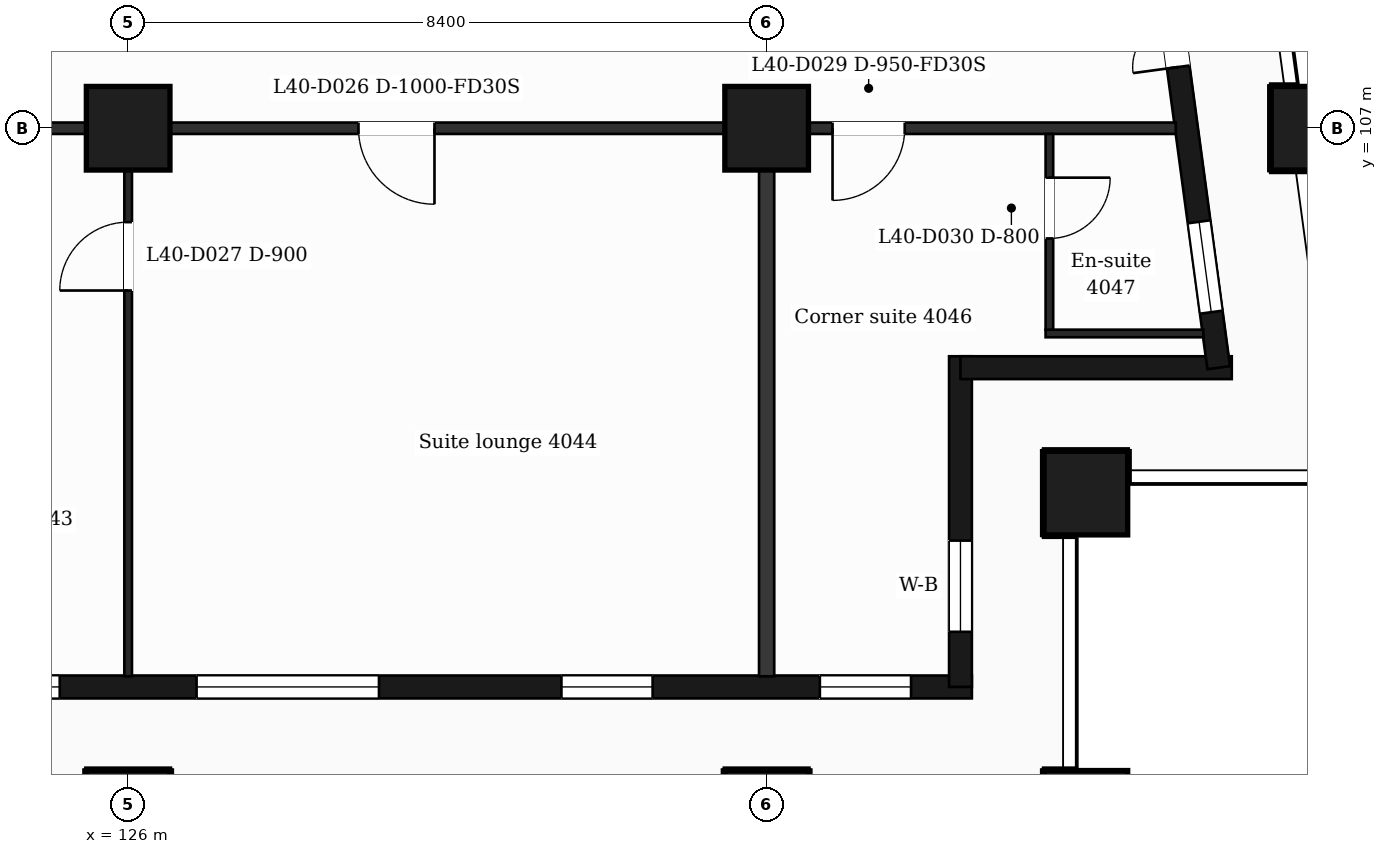
"""IFC4 building model, lengths in metres.
Left out: names, types, materials, properties, quantities, classifications, styles, units other than length and angle.
Written with IfcOpenShell. Run it as: python <this file> out.ifc"""

import sys

from ifc_helpers import new_model, si_unit, direction, frame, frame_2d, origin, origin_2d, place, context, subcontext, project, spatial, rectangle, extrude, element, fill, save


model = new_model("IFC4")
c1 = context("Model", 3, precision=1e-05, world=origin(), true_north=direction((0.0, 1.0)))
c2 = subcontext(c1, "Body", "Model", "MODEL_VIEW")
j1 = project(units=[si_unit("LENGTHUNIT", "METRE"), si_unit("PLANEANGLEUNIT", "RADIAN")], contexts=[c1])
p1 = place(None, origin())
s1 = spatial("IfcSite", under=j1, at=p1, CompositionType="ELEMENT")
p2 = place(p1, origin())
s2 = spatial("IfcBuilding", under=s1, at=p2, CompositionType="ELEMENT")
p3 = place(p2, frame((0.0, 0.0, 170.0)))
s3 = spatial("IfcBuildingStorey", under=s2, at=p3, CompositionType="ELEMENT", Elevation=170.0)
for number, where, z_axis, x_axis in (
    (1, (126.0, 98.0, 0.0), (0.0, 0.0, 1.0), (1.0, 0.0, 0.0)),
    (2, (134.4, 98.0, 0.0), (0.0, 0.0, 1.0), (1.0, 0.0, 0.0)),
    (3, (138.6, 98.0, 0.0), (0.0, 0.0, 1.0), (1.0, 0.0, 0.0)),
    (4, (138.6, 102.2, 0.0), (0.0, 0.0, 1.0), (1.0, 0.0, 0.0)),
    (5, (126.0, 107.0, 0.0), (0.0, 0.0, 1.0), (1.0, 0.0, 0.0)),
    (6, (134.4, 107.0, 0.0), (0.0, 0.0, 1.0), (1.0, 0.0, 0.0)),
    (7, (141.588, 107.0, 0.0), (0.0, 0.0, 1.0), (1.0, 0.0, 0.0)),
):
    element("IfcColumn", number, at=place(p3, frame(where, z_axis=z_axis, x_axis=x_axis)), inside=s3, PredefinedType="COLUMN", context=c2, shape_type="SweptSolid", body=[
        extrude(rectangle(XDim=1.1, YDim=1.1, at=origin_2d()), origin(), (0.0, 0.0, 1.0), 3.7),
    ])
p4 = place(p3, frame((89.85, 99.65, 0.0), z_axis=(0.0, 0.0, 1.0), x_axis=(1.0, 0.0, 0.0)))
e8 = element("IfcWall", 8, at=p4, inside=s3, PredefinedType="SOLIDWALL", context=c2, shape_type="SweptSolid", body=[
    extrude(rectangle(XDim=47.25, YDim=0.3, at=frame_2d((23.625, 0.0))), origin(), (0.0, 0.0, 1.0), 3.38),
])
p5 = place(p4, frame((0.725, 0.0, 0.9)))
e9 = element("IfcOpeningElement", 9, at=p5, cuts=e8, PredefinedType="OPENING", context=c2, shape_type="SweptSolid", body=[
    extrude(rectangle(XDim=1.2, YDim=2.1, at=frame_2d((0.6, 1.05))), frame((0.0, 0.16, 0.0), z_axis=(0.0, -1.0, 0.0), x_axis=(1.0, 0.0, 0.0)), (0.0, 0.0, 1.0), 0.32),
])
p6 = place(p4, frame((3.45, 0.0, 0.9)))
e10 = element("IfcOpeningElement", 10, at=p6, cuts=e8, PredefinedType="OPENING", context=c2, shape_type="SweptSolid", body=[
    extrude(rectangle(XDim=2.4, YDim=2.1, at=frame_2d((1.2, 1.05))), frame((0.0, 0.16, 0.0), z_axis=(0.0, -1.0, 0.0), x_axis=(1.0, 0.0, 0.0)), (0.0, 0.0, 1.0), 0.32),
])
p7 = place(p4, frame((7.65, 0.0, 0.9)))
e11 = element("IfcOpeningElement", 11, at=p7, cuts=e8, PredefinedType="OPENING", context=c2, shape_type="SweptSolid", body=[
    extrude(rectangle(XDim=2.4, YDim=2.1, at=frame_2d((1.2, 1.05))), frame((0.0, 0.16, 0.0), z_axis=(0.0, -1.0, 0.0), x_axis=(1.0, 0.0, 0.0)), (0.0, 0.0, 1.0), 0.32),
])
p8 = place(p4, frame((12.45, 0.0, 0.9)))
e12 = element("IfcOpeningElement", 12, at=p8, cuts=e8, PredefinedType="OPENING", context=c2, shape_type="SweptSolid", body=[
    extrude(rectangle(XDim=1.2, YDim=2.1, at=frame_2d((0.6, 1.05))), frame((0.0, 0.16, 0.0), z_axis=(0.0, -1.0, 0.0), x_axis=(1.0, 0.0, 0.0)), (0.0, 0.0, 1.0), 0.32),
])
p9 = place(p4, frame((16.65, 0.0, 0.9)))
e13 = element("IfcOpeningElement", 13, at=p9, cuts=e8, PredefinedType="OPENING", context=c2, shape_type="SweptSolid", body=[
    extrude(rectangle(XDim=1.2, YDim=2.1, at=frame_2d((0.6, 1.05))), frame((0.0, 0.16, 0.0), z_axis=(0.0, -1.0, 0.0), x_axis=(1.0, 0.0, 0.0)), (0.0, 0.0, 1.0), 0.32),
])
p10 = place(p4, frame((19.95, 0.0, 0.0)))
e14 = element("IfcOpeningElement", 14, at=p10, cuts=e8, PredefinedType="OPENING", context=c2, shape_type="SweptSolid", body=[
    extrude(rectangle(XDim=1.2, YDim=2.4, at=frame_2d((0.6, 1.2))), frame((0.0, 0.16, 0.0), z_axis=(0.0, -1.0, 0.0), x_axis=(1.0, 0.0, 0.0)), (0.0, 0.0, 1.0), 0.32),
])
p11 = place(p4, frame((21.75, 0.0, 0.9)))
e15 = element("IfcOpeningElement", 15, at=p11, cuts=e8, PredefinedType="OPENING", context=c2, shape_type="SweptSolid", body=[
    extrude(rectangle(XDim=1.2, YDim=2.1, at=frame_2d((0.6, 1.05))), frame((0.0, 0.16, 0.0), z_axis=(0.0, -1.0, 0.0), x_axis=(1.0, 0.0, 0.0)), (0.0, 0.0, 1.0), 0.32),
])
p12 = place(p4, frame((24.45, 0.0, 0.9)))
e16 = element("IfcOpeningElement", 16, at=p12, cuts=e8, PredefinedType="OPENING", context=c2, shape_type="SweptSolid", body=[
    extrude(rectangle(XDim=2.4, YDim=2.1, at=frame_2d((1.2, 1.05))), frame((0.0, 0.16, 0.0), z_axis=(0.0, -1.0, 0.0), x_axis=(1.0, 0.0, 0.0)), (0.0, 0.0, 1.0), 0.32),
])
p13 = place(p4, frame((28.35, 0.0, 0.0)))
e17 = element("IfcOpeningElement", 17, at=p13, cuts=e8, PredefinedType="OPENING", context=c2, shape_type="SweptSolid", body=[
    extrude(rectangle(XDim=1.2, YDim=2.4, at=frame_2d((0.6, 1.2))), frame((0.0, 0.16, 0.0), z_axis=(0.0, -1.0, 0.0), x_axis=(1.0, 0.0, 0.0)), (0.0, 0.0, 1.0), 0.32),
])
p14 = place(p4, frame((30.15, 0.0, 0.9)))
e18 = element("IfcOpeningElement", 18, at=p14, cuts=e8, PredefinedType="OPENING", context=c2, shape_type="SweptSolid", body=[
    extrude(rectangle(XDim=1.2, YDim=2.1, at=frame_2d((0.6, 1.05))), frame((0.0, 0.16, 0.0), z_axis=(0.0, -1.0, 0.0), x_axis=(1.0, 0.0, 0.0)), (0.0, 0.0, 1.0), 0.32),
])
p15 = place(p4, frame((32.85, 0.0, 0.9)))
e19 = element("IfcOpeningElement", 19, at=p15, cuts=e8, PredefinedType="OPENING", context=c2, shape_type="SweptSolid", body=[
    extrude(rectangle(XDim=2.4, YDim=2.1, at=frame_2d((1.2, 1.05))), frame((0.0, 0.16, 0.0), z_axis=(0.0, -1.0, 0.0), x_axis=(1.0, 0.0, 0.0)), (0.0, 0.0, 1.0), 0.32),
])
p16 = place(p4, frame((37.05, 0.0, 0.9)))
e20 = element("IfcOpeningElement", 20, at=p16, cuts=e8, PredefinedType="OPENING", context=c2, shape_type="SweptSolid", body=[
    extrude(rectangle(XDim=2.4, YDim=2.1, at=frame_2d((1.2, 1.05))), frame((0.0, 0.16, 0.0), z_axis=(0.0, -1.0, 0.0), x_axis=(1.0, 0.0, 0.0)), (0.0, 0.0, 1.0), 0.32),
])
p17 = place(p4, frame((41.85, 0.0, 0.9)))
e21 = element("IfcOpeningElement", 21, at=p17, cuts=e8, PredefinedType="OPENING", context=c2, shape_type="SweptSolid", body=[
    extrude(rectangle(XDim=1.2, YDim=2.1, at=frame_2d((0.6, 1.05))), frame((0.0, 0.16, 0.0), z_axis=(0.0, -1.0, 0.0), x_axis=(1.0, 0.0, 0.0)), (0.0, 0.0, 1.0), 0.32),
])
p18 = place(p4, frame((45.25, 0.0, 0.9)))
e22 = element("IfcOpeningElement", 22, at=p18, cuts=e8, PredefinedType="OPENING", context=c2, shape_type="SweptSolid", body=[
    extrude(rectangle(XDim=1.2, YDim=2.1, at=frame_2d((0.6, 1.05))), frame((0.0, 0.16, 0.0), z_axis=(0.0, -1.0, 0.0), x_axis=(1.0, 0.0, 0.0)), (0.0, 0.0, 1.0), 0.32),
])
p19 = place(p3, frame((136.95, 99.65, 0.0), z_axis=(0.0, 0.0, 1.0), x_axis=(0.0, 1.0, 0.0)))
e23 = element("IfcWall", 23, at=p19, inside=s3, PredefinedType="SOLIDWALL", context=c2, shape_type="SweptSolid", body=[
    extrude(rectangle(XDim=4.35, YDim=0.3, at=frame_2d((2.175, 0.0))), origin(), (0.0, 0.0, 1.0), 3.38),
])
p20 = place(p19, frame((0.725, 0.0, 0.9)))
e24 = element("IfcOpeningElement", 24, at=p20, cuts=e23, PredefinedType="OPENING", context=c2, shape_type="SweptSolid", body=[
    extrude(rectangle(XDim=1.2, YDim=2.1, at=frame_2d((0.6, 1.05))), frame((0.0, 0.16, 0.0), z_axis=(0.0, -1.0, 0.0), x_axis=(1.0, 0.0, 0.0)), (0.0, 0.0, 1.0), 0.32),
])
p21 = place(p3, frame((136.95, 103.85, 0.0), z_axis=(0.0, 0.0, 1.0), x_axis=(1.0, 0.0, 0.0)))
e25 = element("IfcWall", 25, at=p21, inside=s3, PredefinedType="SOLIDWALL", context=c2, shape_type="SweptSolid", body=[
    extrude(rectangle(XDim=3.569, YDim=0.3, at=frame_2d((1.785, 0.0))), origin(), (0.0, 0.0, 1.0), 3.38),
])
p22 = place(p3, frame((140.348, 103.85, 0.0), z_axis=(0.0, 0.0, 1.0), x_axis=(-0.133431549479, 0.991058031401, 0.0)))
e26 = element("IfcWall", 26, at=p22, inside=s3, PredefinedType="SOLIDWALL", context=c2, shape_type="SweptSolid", body=[
    extrude(rectangle(XDim=6.609, YDim=0.3, at=frame_2d((3.304, 0.0))), origin(), (0.0, 0.0, 1.0), 3.38),
])
p23 = place(p22, frame((0.737, 0.0, 0.9)))
e27 = element("IfcOpeningElement", 27, at=p23, cuts=e26, PredefinedType="OPENING", context=c2, shape_type="SweptSolid", body=[
    extrude(rectangle(XDim=1.2, YDim=2.1, at=frame_2d((0.6, 1.05))), frame((0.0, 0.16, 0.0), z_axis=(0.0, -1.0, 0.0), x_axis=(1.0, 0.0, 0.0)), (0.0, 0.0, 1.0), 0.32),
])
p24 = place(p22, frame((3.991, 0.0, 0.0)))
e28 = element("IfcOpeningElement", 28, at=p24, cuts=e26, PredefinedType="OPENING", context=c2, shape_type="SweptSolid", body=[
    extrude(rectangle(XDim=1.2, YDim=2.4, at=frame_2d((0.6, 1.2))), frame((0.0, 0.16, 0.0), z_axis=(0.0, -1.0, 0.0), x_axis=(1.0, 0.0, 0.0)), (0.0, 0.0, 1.0), 0.32),
])
p25 = place(p3, frame((138.07, 104.3, 0.0), z_axis=(0.0, 0.0, 1.0), x_axis=(1.0, 0.0, 0.0)))
e29 = element("IfcWall", 29, at=p25, inside=s3, PredefinedType="PARTITIONING", context=c2, shape_type="SweptSolid", body=[
    extrude(rectangle(XDim=2.076, YDim=0.1, at=frame_2d((1.038, 0.0))), origin(), (0.0, 0.0, 1.0), 3.38),
])
p26 = place(p3, frame((87.018, 107.0, 0.0), z_axis=(0.0, 0.0, 1.0), x_axis=(1.0, 0.0, 0.0)))
e30 = element("IfcWall", 30, at=p26, inside=s3, PredefinedType="PARTITIONING", context=c2, shape_type="SweptSolid", body=[
    extrude(rectangle(XDim=52.765, YDim=0.15, at=frame_2d((26.382, 0.0))), origin(), (0.0, 0.0, 1.0), 3.38),
])
p27 = place(p26, frame((0.463, 0.0, 0.0)))
e31 = element("IfcOpeningElement", 31, at=p27, cuts=e30, PredefinedType="OPENING", context=c2, shape_type="SweptSolid", body=[
    extrude(rectangle(XDim=0.95, YDim=2.1, at=frame_2d((0.475, 1.05))), frame((0.0, 0.085, 0.0), z_axis=(0.0, -1.0, 0.0), x_axis=(1.0, 0.0, 0.0)), (0.0, 0.0, 1.0), 0.17),
])
p28 = place(p26, frame((6.369, 0.0, 0.0)))
e32 = element("IfcOpeningElement", 32, at=p28, cuts=e30, PredefinedType="OPENING", context=c2, shape_type="SweptSolid", body=[
    extrude(rectangle(XDim=0.95, YDim=2.1, at=frame_2d((0.475, 1.05))), frame((0.0, 0.085, 0.0), z_axis=(0.0, -1.0, 0.0), x_axis=(1.0, 0.0, 0.0)), (0.0, 0.0, 1.0), 0.17),
])
p29 = place(p26, frame((9.857, 0.0, 0.0)))
e33 = element("IfcOpeningElement", 33, at=p29, cuts=e30, PredefinedType="OPENING", context=c2, shape_type="SweptSolid", body=[
    extrude(rectangle(XDim=0.95, YDim=2.1, at=frame_2d((0.475, 1.05))), frame((0.0, 0.085, 0.0), z_axis=(0.0, -1.0, 0.0), x_axis=(1.0, 0.0, 0.0)), (0.0, 0.0, 1.0), 0.17),
])
p30 = place(p26, frame((15.382, 0.0, 0.0)))
e34 = element("IfcOpeningElement", 34, at=p30, cuts=e30, PredefinedType="OPENING", context=c2, shape_type="SweptSolid", body=[
    extrude(rectangle(XDim=1.0, YDim=2.1, at=frame_2d((0.5, 1.05))), frame((0.0, 0.085, 0.0), z_axis=(0.0, -1.0, 0.0), x_axis=(1.0, 0.0, 0.0)), (0.0, 0.0, 1.0), 0.17),
])
p31 = place(p26, frame((24.932, 0.0, 0.0)))
e35 = element("IfcOpeningElement", 35, at=p31, cuts=e30, PredefinedType="OPENING", context=c2, shape_type="SweptSolid", body=[
    extrude(rectangle(XDim=1.0, YDim=2.1, at=frame_2d((0.5, 1.05))), frame((0.0, 0.085, 0.0), z_axis=(0.0, -1.0, 0.0), x_axis=(1.0, 0.0, 0.0)), (0.0, 0.0, 1.0), 0.17),
])
p32 = place(p26, frame((27.819, 0.0, 0.0)))
e36 = element("IfcOpeningElement", 36, at=p32, cuts=e30, PredefinedType="OPENING", context=c2, shape_type="SweptSolid", body=[
    extrude(rectangle(XDim=0.95, YDim=2.1, at=frame_2d((0.475, 1.05))), frame((0.0, 0.085, 0.0), z_axis=(0.0, -1.0, 0.0), x_axis=(1.0, 0.0, 0.0)), (0.0, 0.0, 1.0), 0.17),
])
p33 = place(p26, frame((42.012, 0.0, 0.0)))
e37 = element("IfcOpeningElement", 37, at=p33, cuts=e30, PredefinedType="OPENING", context=c2, shape_type="SweptSolid", body=[
    extrude(rectangle(XDim=1.0, YDim=2.1, at=frame_2d((0.5, 1.05))), frame((0.0, 0.085, 0.0), z_axis=(0.0, -1.0, 0.0), x_axis=(1.0, 0.0, 0.0)), (0.0, 0.0, 1.0), 0.17),
])
p34 = place(p26, frame((48.249, 0.0, 0.0)))
e38 = element("IfcOpeningElement", 38, at=p34, cuts=e30, PredefinedType="OPENING", context=c2, shape_type="SweptSolid", body=[
    extrude(rectangle(XDim=0.95, YDim=2.1, at=frame_2d((0.475, 1.05))), frame((0.0, 0.085, 0.0), z_axis=(0.0, -1.0, 0.0), x_axis=(1.0, 0.0, 0.0)), (0.0, 0.0, 1.0), 0.17),
])
p35 = place(p3, frame((126.0, 99.79, 0.0), z_axis=(0.0, 0.0, 1.0), x_axis=(0.0, 1.0, 0.0)))
e39 = element("IfcWall", 39, at=p35, inside=s3, PredefinedType="PARTITIONING", context=c2, shape_type="SweptSolid", body=[
    extrude(rectangle(XDim=7.135, YDim=0.1, at=frame_2d((3.567, 0.0))), origin(), (0.0, 0.0, 1.0), 3.38),
])
p36 = place(p35, frame((5.075, 0.0, 0.0)))
e40 = element("IfcOpeningElement", 40, at=p36, cuts=e39, PredefinedType="OPENING", context=c2, shape_type="SweptSolid", body=[
    extrude(rectangle(XDim=0.9, YDim=2.1, at=frame_2d((0.45, 1.05))), frame((0.0, 0.06, 0.0), z_axis=(0.0, -1.0, 0.0), x_axis=(1.0, 0.0, 0.0)), (0.0, 0.0, 1.0), 0.12),
])
p37 = place(p3, frame((134.4, 99.79, 0.0), z_axis=(0.0, 0.0, 1.0), x_axis=(0.0, 1.0, 0.0)))
e41 = element("IfcWall", 41, at=p37, inside=s3, PredefinedType="PARTITIONING", context=c2, shape_type="SweptSolid", body=[
    extrude(rectangle(XDim=7.135, YDim=0.2, at=frame_2d((3.567, 0.0))), origin(), (0.0, 0.0, 1.0), 3.38),
])
p38 = place(p3, frame((138.12, 104.35, 0.0), z_axis=(0.0, 0.0, 1.0), x_axis=(0.0, 1.0, 0.0)))
e42 = element("IfcWall", 42, at=p38, inside=s3, PredefinedType="PARTITIONING", context=c2, shape_type="SweptSolid", body=[
    extrude(rectangle(XDim=2.575, YDim=0.1, at=frame_2d((1.288, 0.0))), origin(), (0.0, 0.0, 1.0), 3.38),
])
p39 = place(p38, frame((1.2, 0.0, 0.0)))
e43 = element("IfcOpeningElement", 43, at=p39, cuts=e42, PredefinedType="OPENING", context=c2, shape_type="SweptSolid", body=[
    extrude(rectangle(XDim=0.8, YDim=2.1, at=frame_2d((0.4, 1.05))), frame((0.0, 0.06, 0.0), z_axis=(0.0, -1.0, 0.0), x_axis=(1.0, 0.0, 0.0)), (0.0, 0.0, 1.0), 0.12),
])
p40 = place(p15, origin())
e44 = element("IfcWindow", 44, at=p40, inside=s3, PartitioningType="SINGLE_PANEL", PredefinedType="WINDOW", context=c2, shape_type="SweptSolid", body=[
    extrude(rectangle(XDim=2.4, YDim=2.1, at=frame_2d((1.2, 1.05))), frame((0.0, 0.03, 0.0), z_axis=(0.0, -1.0, 0.0), x_axis=(1.0, 0.0, 0.0)), (0.0, 0.0, 1.0), 0.06),
])
fill(e19, e44)
p41 = place(p16, origin())
e45 = element("IfcWindow", 45, at=p41, inside=s3, PartitioningType="SINGLE_PANEL", PredefinedType="WINDOW", context=c2, shape_type="SweptSolid", body=[
    extrude(rectangle(XDim=2.4, YDim=2.1, at=frame_2d((1.2, 1.05))), frame((0.0, 0.03, 0.0), z_axis=(0.0, -1.0, 0.0), x_axis=(1.0, 0.0, 0.0)), (0.0, 0.0, 1.0), 0.06),
])
fill(e20, e45)
p42 = place(p17, origin())
e46 = element("IfcWindow", 46, at=p42, inside=s3, PartitioningType="SINGLE_PANEL", PredefinedType="WINDOW", context=c2, shape_type="SweptSolid", body=[
    extrude(rectangle(XDim=1.2, YDim=2.1, at=frame_2d((0.6, 1.05))), frame((0.0, 0.03, 0.0), z_axis=(0.0, -1.0, 0.0), x_axis=(1.0, 0.0, 0.0)), (0.0, 0.0, 1.0), 0.06),
])
fill(e21, e46)
p43 = place(p18, origin())
e47 = element("IfcWindow", 47, at=p43, inside=s3, PartitioningType="SINGLE_PANEL", PredefinedType="WINDOW", context=c2, shape_type="SweptSolid", body=[
    extrude(rectangle(XDim=1.2, YDim=2.1, at=frame_2d((0.6, 1.05))), frame((0.0, 0.03, 0.0), z_axis=(0.0, -1.0, 0.0), x_axis=(1.0, 0.0, 0.0)), (0.0, 0.0, 1.0), 0.06),
])
fill(e22, e47)
p44 = place(p20, origin())
e48 = element("IfcWindow", 48, at=p44, inside=s3, PartitioningType="SINGLE_PANEL", PredefinedType="WINDOW", context=c2, shape_type="SweptSolid", body=[
    extrude(rectangle(XDim=1.2, YDim=2.1, at=frame_2d((0.6, 1.05))), frame((0.0, 0.03, 0.0), z_axis=(0.0, -1.0, 0.0), x_axis=(1.0, 0.0, 0.0)), (0.0, 0.0, 1.0), 0.06),
])
fill(e24, e48)
p45 = place(p23, origin())
e49 = element("IfcWindow", 49, at=p45, inside=s3, PartitioningType="SINGLE_PANEL", PredefinedType="WINDOW", context=c2, shape_type="SweptSolid", body=[
    extrude(rectangle(XDim=1.2, YDim=2.1, at=frame_2d((0.6, 1.05))), frame((0.0, 0.03, 0.0), z_axis=(0.0, -1.0, 0.0), x_axis=(1.0, 0.0, 0.0)), (0.0, 0.0, 1.0), 0.06),
])
fill(e27, e49)
p46 = place(p24, origin())
e50 = element("IfcDoor", 50, at=p46, inside=s3, OperationType="DOUBLE_DOOR_SINGLE_SWING", PredefinedType="DOOR", context=c2, shape_type="SweptSolid", body=[
    extrude(rectangle(XDim=1.2, YDim=2.4, at=frame_2d((0.6, 1.2))), frame((0.0, 0.025, 0.0), z_axis=(0.0, -1.0, 0.0), x_axis=(1.0, 0.0, 0.0)), (0.0, 0.0, 1.0), 0.05),
])
fill(e28, e50)
p47 = place(p33, origin())
e51 = element("IfcDoor", 51, at=p47, inside=s3, OperationType="SINGLE_SWING_RIGHT", PredefinedType="DOOR", context=c2, shape_type="SweptSolid", body=[
    extrude(rectangle(XDim=1.0, YDim=2.1, at=frame_2d((0.5, 1.05))), frame((0.0, 0.025, 0.0), z_axis=(0.0, -1.0, 0.0), x_axis=(1.0, 0.0, 0.0)), (0.0, 0.0, 1.0), 0.05),
])
fill(e37, e51)
p48 = place(p36, origin())
e52 = element("IfcDoor", 52, at=p48, inside=s3, OperationType="SINGLE_SWING_LEFT", PredefinedType="DOOR", context=c2, shape_type="SweptSolid", body=[
    extrude(rectangle(XDim=0.9, YDim=2.1, at=frame_2d((0.45, 1.05))), frame((0.0, 0.025, 0.0), z_axis=(0.0, -1.0, 0.0), x_axis=(1.0, 0.0, 0.0)), (0.0, 0.0, 1.0), 0.05),
])
fill(e40, e52)
p49 = place(p34, origin())
e53 = element("IfcDoor", 53, at=p49, inside=s3, OperationType="SINGLE_SWING_LEFT", PredefinedType="DOOR", context=c2, shape_type="SweptSolid", body=[
    extrude(rectangle(XDim=0.95, YDim=2.1, at=frame_2d((0.475, 1.05))), frame((0.0, 0.025, 0.0), z_axis=(0.0, -1.0, 0.0), x_axis=(1.0, 0.0, 0.0)), (0.0, 0.0, 1.0), 0.05),
])
fill(e38, e53)
p50 = place(p39, origin())
e54 = element("IfcDoor", 54, at=p50, inside=s3, OperationType="SINGLE_SWING_RIGHT", PredefinedType="DOOR", context=c2, shape_type="SweptSolid", body=[
    extrude(rectangle(XDim=0.8, YDim=2.1, at=frame_2d((0.4, 1.05))), frame((0.0, 0.025, 0.0), z_axis=(0.0, -1.0, 0.0), x_axis=(1.0, 0.0, 0.0)), (0.0, 0.0, 1.0), 0.05),
])
fill(e43, e54)
save(model, sys.argv[1])
